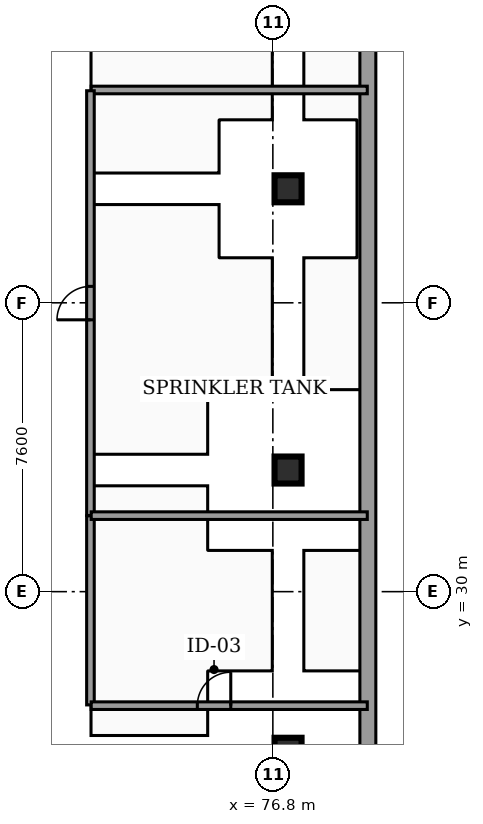
"""IFC4 building model, lengths in metres.
Left out: names, types, materials, properties, quantities, classifications, styles, units other than length and angle.
Written with IfcOpenShell. Run it as: python <this file> out.ifc"""

import sys

from ifc_helpers import new_model, si_unit, direction, frame, frame_2d, origin, origin_2d, place, context, subcontext, project, spatial, rectangle, hollow_circle, extrude, element, fill, save


model = new_model("IFC4")
c1 = context("Model", 3, precision=1e-05, world=origin(), true_north=direction((0.0, 1.0)))
c2 = subcontext(c1, "Body", "Model", "MODEL_VIEW")
j1 = project(units=[si_unit("LENGTHUNIT", "METRE"), si_unit("PLANEANGLEUNIT", "RADIAN")], contexts=[c1])
p1 = place(None, origin())
s1 = spatial("IfcSite", under=j1, at=p1, CompositionType="ELEMENT")
p2 = place(p1, origin())
s2 = spatial("IfcBuilding", under=s1, at=p2, CompositionType="ELEMENT")
p3 = place(p2, frame((0.0, 0.0, -8.16)))
s3 = spatial("IfcBuildingStorey", under=s2, at=p3, CompositionType="ELEMENT", Elevation=-8.16)
p4 = place(p3, frame((79.3, 9.0, 0.0), z_axis=(0.0, 0.0, 1.0), x_axis=(0.0, 1.0, 0.0)))
e1 = element("IfcWall", 1, at=p4, inside=s3, PredefinedType="SOLIDWALL", context=c2, shape_type="SweptSolid", body=[
    extrude(rectangle(XDim=39.0, YDim=0.42, at=frame_2d((19.5, 0.0))), origin(), (0.0, 0.0, 1.0), 3.76),
])
for number, where, z_axis, x_axis in (
    (2, (77.2, 33.2, 0.0), (0.0, 0.0, 1.0), (1.0, 0.0, 0.0)),
    (3, (77.2, 40.6, 0.0), (0.0, 0.0, 1.0), (1.0, 0.0, 0.0)),
    (4, (77.2, 25.8, 0.0), (0.0, 0.0, 1.0), (1.0, 0.0, 0.0)),
):
    element("IfcColumn", number, at=place(p3, frame(where, z_axis=z_axis, x_axis=x_axis)), inside=s3, PredefinedType="COLUMN", context=c2, shape_type="SweptSolid", body=[
        extrude(hollow_circle(Radius=0.355, WallThickness=0.03, at=origin_2d()), origin(), (0.0, 0.0, 1.0), 3.76),
    ])
p5 = place(p3, frame((72.0, 27.02, 0.0), z_axis=(0.0, 0.0, 1.0), x_axis=(0.0, 1.0, 0.0)))
e5 = element("IfcWall", 5, at=p5, inside=s3, PredefinedType="PARTITIONING", context=c2, shape_type="SweptSolid", body=[
    extrude(rectangle(XDim=4.975, YDim=0.2, at=frame_2d((2.488, 0.0))), origin(), (0.0, 0.0, 1.0), 2.717),
])
p6 = place(p3, frame((72.02, 27.0, 0.0), z_axis=(0.0, 0.0, 1.0), x_axis=(1.0, 0.0, 0.0)))
e6 = element("IfcWall", 6, at=p6, inside=s3, PredefinedType="PARTITIONING", context=c2, shape_type="SweptSolid", body=[
    extrude(rectangle(XDim=7.265, YDim=0.2, at=frame_2d((3.632, 0.0))), origin(), (0.0, 0.0, 1.0), 2.717),
])
p7 = place(p6, frame((2.792, 0.0, 0.0)))
e7 = element("IfcOpeningElement", 7, at=p7, cuts=e6, PredefinedType="OPENING", context=c2, shape_type="SweptSolid", body=[
    extrude(rectangle(XDim=0.88, YDim=2.05, at=frame_2d((0.44, 1.025))), frame((0.0, 0.11, 0.0), z_axis=(0.0, -1.0, 0.0), x_axis=(1.0, 0.0, 0.0)), (0.0, 0.0, 1.0), 0.22),
])
p8 = place(p3, frame((72.02, 43.2, 0.0), z_axis=(0.0, 0.0, 1.0), x_axis=(1.0, 0.0, 0.0)))
e8 = element("IfcWall", 8, at=p8, inside=s3, PredefinedType="PARTITIONING", context=c2, shape_type="SweptSolid", body=[
    extrude(rectangle(XDim=7.265, YDim=0.2, at=frame_2d((3.632, 0.0))), origin(), (0.0, 0.0, 1.0), 2.717),
])
p9 = place(p3, frame((72.0, 32.005, 0.0), z_axis=(0.0, 0.0, 1.0), x_axis=(0.0, 1.0, 0.0)))
e9 = element("IfcWall", 9, at=p9, inside=s3, PredefinedType="PARTITIONING", context=c2, shape_type="SweptSolid", body=[
    extrude(rectangle(XDim=11.175, YDim=0.2, at=frame_2d((5.587, 0.0))), origin(), (0.0, 0.0, 1.0), 2.717),
])
p10 = place(p9, frame((5.147, 0.0, 0.0)))
e10 = element("IfcOpeningElement", 10, at=p10, cuts=e9, PredefinedType="OPENING", context=c2, shape_type="SweptSolid", body=[
    extrude(rectangle(XDim=0.88, YDim=2.05, at=frame_2d((0.44, 1.025))), frame((0.0, 0.11, 0.0), z_axis=(0.0, -1.0, 0.0), x_axis=(1.0, 0.0, 0.0)), (0.0, 0.0, 1.0), 0.22),
])
p11 = place(p3, frame((72.02, 32.0, 0.0), z_axis=(0.0, 0.0, 1.0), x_axis=(1.0, 0.0, 0.0)))
e11 = element("IfcWall", 11, at=p11, inside=s3, PredefinedType="PARTITIONING", context=c2, shape_type="SweptSolid", body=[
    extrude(rectangle(XDim=7.265, YDim=0.2, at=frame_2d((3.632, 0.0))), origin(), (0.0, 0.0, 1.0), 2.717),
])
p12 = place(p7, origin())
e12 = element("IfcDoor", 12, at=p12, inside=s3, OperationType="SINGLE_SWING_RIGHT", PredefinedType="DOOR", context=c2, shape_type="SweptSolid", body=[
    extrude(rectangle(XDim=0.88, YDim=2.05, at=frame_2d((0.44, 1.025))), frame((0.0, 0.025, 0.0), z_axis=(0.0, -1.0, 0.0), x_axis=(1.0, 0.0, 0.0)), (0.0, 0.0, 1.0), 0.05),
])
fill(e7, e12)
p13 = place(p10, origin())
e13 = element("IfcDoor", 13, at=p13, inside=s3, OperationType="SINGLE_SWING_LEFT", PredefinedType="DOOR", context=c2, shape_type="SweptSolid", body=[
    extrude(rectangle(XDim=0.88, YDim=2.05, at=frame_2d((0.44, 1.025))), frame((0.0, 0.025, 0.0), z_axis=(0.0, -1.0, 0.0), x_axis=(1.0, 0.0, 0.0)), (0.0, 0.0, 1.0), 0.05),
])
fill(e10, e13)
save(model, sys.argv[1])
